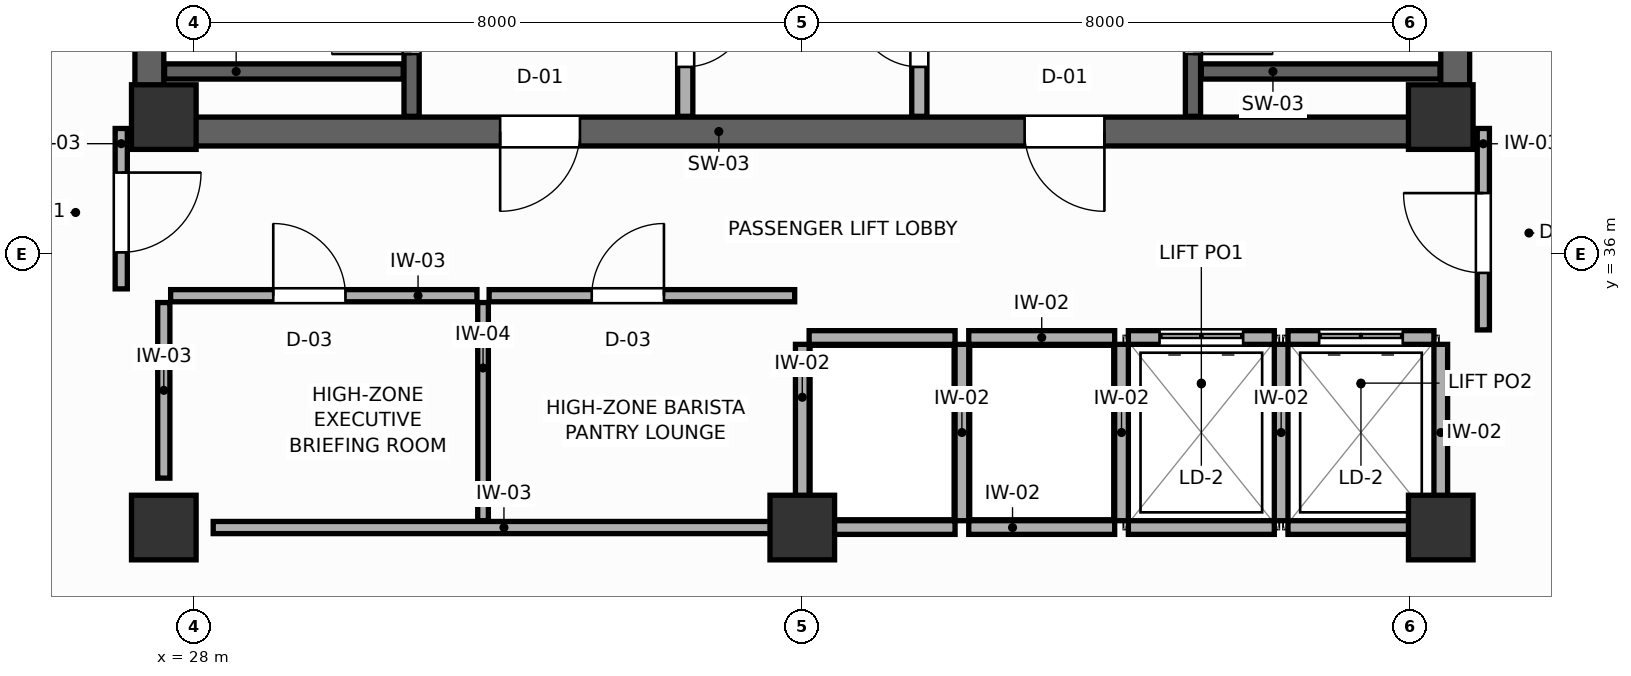
"""IFC4 building model, lengths in metres.
Left out: names, types, materials, properties, quantities, classifications, styles, units other than length and angle.
Written with IfcOpenShell. Run it as: python <this file> out.ifc"""

import sys

from ifc_helpers import new_model, si_unit, direction, frame, frame_2d, origin, origin_2d, place, context, subcontext, project, spatial, rectangle, extrude, source, transform, mapped, element, fill, save


model = new_model("IFC4")
c1 = context("Model", 3, precision=1e-05, world=origin(), true_north=direction((0.0, 1.0)))
c2 = subcontext(c1, "Body", "Model", "MODEL_VIEW")
j1 = project(units=[si_unit("LENGTHUNIT", "METRE"), si_unit("PLANEANGLEUNIT", "RADIAN")], contexts=[c1])
p1 = place(None, origin())
s1 = spatial("IfcSite", under=j1, at=p1, CompositionType="ELEMENT")
p2 = place(p1, origin())
s2 = spatial("IfcBuilding", under=s1, at=p2, CompositionType="ELEMENT")
p3 = place(p2, frame((0.0, 0.0, 275.4)))
s3 = spatial("IfcBuildingStorey", under=s2, at=p3, CompositionType="ELEMENT", Elevation=275.4)
p4 = place(p3, frame((27.22, 37.61, 0.0), z_axis=(0.0, 0.0, 1.0), x_axis=(1.0, 0.0, 0.0)))
e1 = element("IfcWall", 1, at=p4, inside=s3, PredefinedType="SHEAR", context=c2, shape_type="SweptSolid", body=[
    extrude(rectangle(XDim=17.56, YDim=0.38, at=frame_2d((8.78, 0.0))), origin(), (0.0, 0.0, 1.0), 4.2),
])
p5 = place(p4, frame((4.805, 0.0, 0.0)))
e2 = element("IfcOpeningElement", 2, at=p5, cuts=e1, PredefinedType="OPENING", context=c2, shape_type="SweptSolid", body=[
    extrude(rectangle(XDim=1.05, YDim=2.1, at=frame_2d((0.525, 1.05))), frame((0.0, 0.2, 0.0), z_axis=(0.0, -1.0, 0.0), x_axis=(1.0, 0.0, 0.0)), (0.0, 0.0, 1.0), 0.4),
])
p6 = place(p4, frame((11.705, 0.0, 0.0)))
e3 = element("IfcOpeningElement", 3, at=p6, cuts=e1, PredefinedType="OPENING", context=c2, shape_type="SweptSolid", body=[
    extrude(rectangle(XDim=1.05, YDim=2.1, at=frame_2d((0.525, 1.05))), frame((0.0, 0.2, 0.0), z_axis=(0.0, -1.0, 0.0), x_axis=(1.0, 0.0, 0.0)), (0.0, 0.0, 1.0), 0.4),
])
for number, where, z_axis, x_axis in (
    (4, (27.41, 37.8, 0.0), (0.0, 0.0, 1.0), (0.0, 1.0, 0.0)),
    (5, (44.59, 37.8, 0.0), (0.0, 0.0, 1.0), (0.0, 1.0, 0.0)),
):
    element("IfcWall", number, at=place(p3, frame(where, z_axis=z_axis, x_axis=x_axis)), inside=s3, PredefinedType="SHEAR", context=c2, shape_type="SweptSolid", body=[
        extrude(rectangle(XDim=9.0, YDim=0.38, at=frame_2d((4.5, 0.0))), origin(), (0.0, 0.0, 1.0), 4.2),
    ])
m1 = source(origin(), c2, "Body", "SweptSolid", [
    extrude(rectangle(XDim=0.85, YDim=0.85, at=origin_2d()), origin(), (0.0, 0.0, 1.0), 4.2),
])
for number, where, z_axis, x_axis in (
    (6, (27.6, 37.8, 0.0), (0.0, 0.0, 1.0), (1.0, 0.0, 0.0)),
    (7, (44.4, 37.8, 0.0), (0.0, 0.0, 1.0), (1.0, 0.0, 0.0)),
    (8, (27.6, 32.4, 0.0), (0.0, 0.0, 1.0), (1.0, 0.0, 0.0)),
    (9, (44.4, 32.4, 0.0), (0.0, 0.0, 1.0), (1.0, 0.0, 0.0)),
    (10, (36.0, 32.4, 0.0), (0.0, 0.0, 1.0), (1.0, 0.0, 0.0)),
):
    element("IfcColumn", number, at=place(p3, frame(where, z_axis=z_axis, x_axis=x_axis)), inside=s3, PredefinedType="COLUMN", context=c2, shape_type="MappedRepresentation", body=[
        mapped(m1, transform((0.0, 0.0, 0.0), scale=1.0)),
    ])
p7 = place(p3, frame((30.86, 37.81, 0.0), z_axis=(0.0, 0.0, 1.0), x_axis=(0.0, 1.0, 0.0)))
e11 = element("IfcWall", 11, at=p7, inside=s3, PredefinedType="SHEAR", context=c2, shape_type="SweptSolid", body=[
    extrude(rectangle(XDim=8.98, YDim=0.2, at=frame_2d((4.49, 0.0))), origin(), (0.0, 0.0, 1.0), 4.2),
])
p8 = place(p7, frame((0.82, 0.0, 0.0)))
e12 = element("IfcOpeningElement", 12, at=p8, cuts=e11, PredefinedType="OPENING", context=c2, shape_type="SweptSolid", body=[
    extrude(rectangle(XDim=1.05, YDim=2.1, at=frame_2d((0.525, 1.05))), frame((0.0, 0.11, 0.0), z_axis=(0.0, -1.0, 0.0), x_axis=(1.0, 0.0, 0.0)), (0.0, 0.0, 1.0), 0.22),
])
p9 = place(p3, frame((27.61, 38.4, 0.0), z_axis=(0.0, 0.0, 1.0), x_axis=(1.0, 0.0, 0.0)))
e13 = element("IfcWall", 13, at=p9, inside=s3, PredefinedType="SHEAR", context=c2, shape_type="SweptSolid", body=[
    extrude(rectangle(XDim=3.14, YDim=0.2, at=frame_2d((1.57, 0.0))), origin(), (0.0, 0.0, 1.0), 4.2),
])
p10 = place(p3, frame((41.14, 37.81, 0.0), z_axis=(0.0, 0.0, 1.0), x_axis=(0.0, 1.0, 0.0)))
e14 = element("IfcWall", 14, at=p10, inside=s3, PredefinedType="SHEAR", context=c2, shape_type="SweptSolid", body=[
    extrude(rectangle(XDim=8.98, YDim=0.2, at=frame_2d((4.49, 0.0))), origin(), (0.0, 0.0, 1.0), 4.2),
])
p11 = place(p10, frame((0.82, 0.0, 0.0)))
e15 = element("IfcOpeningElement", 15, at=p11, cuts=e14, PredefinedType="OPENING", context=c2, shape_type="SweptSolid", body=[
    extrude(rectangle(XDim=1.05, YDim=2.1, at=frame_2d((0.525, 1.05))), frame((0.0, 0.11, 0.0), z_axis=(0.0, -1.0, 0.0), x_axis=(1.0, 0.0, 0.0)), (0.0, 0.0, 1.0), 0.22),
])
p12 = place(p3, frame((41.25, 38.4, 0.0), z_axis=(0.0, 0.0, 1.0), x_axis=(1.0, 0.0, 0.0)))
e16 = element("IfcWall", 16, at=p12, inside=s3, PredefinedType="SHEAR", context=c2, shape_type="SweptSolid", body=[
    extrude(rectangle(XDim=3.14, YDim=0.2, at=frame_2d((1.57, 0.0))), origin(), (0.0, 0.0, 1.0), 4.2),
])
p13 = place(p3, frame((34.46, 37.81, 0.0), z_axis=(0.0, 0.0, 1.0), x_axis=(0.0, 1.0, 0.0)))
e17 = element("IfcWall", 17, at=p13, inside=s3, PredefinedType="PARTITIONING", context=c2, shape_type="SweptSolid", body=[
    extrude(rectangle(XDim=8.98, YDim=0.2, at=frame_2d((4.49, 0.0))), origin(), (0.0, 0.0, 1.0), 3.96),
])
p14 = place(p13, frame((0.65, 0.0, 0.0)))
e18 = element("IfcOpeningElement", 18, at=p14, cuts=e17, PredefinedType="OPENING", context=c2, shape_type="SweptSolid", body=[
    extrude(rectangle(XDim=0.85, YDim=2.05, at=frame_2d((0.425, 1.025))), frame((0.0, 0.11, 0.0), z_axis=(0.0, -1.0, 0.0), x_axis=(1.0, 0.0, 0.0)), (0.0, 0.0, 1.0), 0.22),
])
p15 = place(p3, frame((37.54, 37.81, 0.0), z_axis=(0.0, 0.0, 1.0), x_axis=(0.0, 1.0, 0.0)))
e19 = element("IfcWall", 19, at=p15, inside=s3, PredefinedType="PARTITIONING", context=c2, shape_type="SweptSolid", body=[
    extrude(rectangle(XDim=8.98, YDim=0.2, at=frame_2d((4.49, 0.0))), origin(), (0.0, 0.0, 1.0), 3.96),
])
p16 = place(p15, frame((0.65, 0.0, 0.0)))
e20 = element("IfcOpeningElement", 20, at=p16, cuts=e19, PredefinedType="OPENING", context=c2, shape_type="SweptSolid", body=[
    extrude(rectangle(XDim=0.85, YDim=2.05, at=frame_2d((0.425, 1.025))), frame((0.0, 0.11, 0.0), z_axis=(0.0, -1.0, 0.0), x_axis=(1.0, 0.0, 0.0)), (0.0, 0.0, 1.0), 0.22),
])
p17 = place(p3, frame((36.09, 34.9, 0.0), z_axis=(0.0, 0.0, 1.0), x_axis=(1.0, 0.0, 0.0)))
e21 = element("IfcWall", 21, at=p17, inside=s3, PredefinedType="PARTITIONING", context=c2, shape_type="SweptSolid", body=[
    extrude(rectangle(XDim=1.92, YDim=0.18, at=frame_2d((0.96, 0.0))), origin(), (0.0, 0.0, 1.0), 3.96),
])
p18 = place(p3, frame((36.09, 32.4, 0.0), z_axis=(0.0, 0.0, 1.0), x_axis=(1.0, 0.0, 0.0)))
e22 = element("IfcWall", 22, at=p18, inside=s3, PredefinedType="PARTITIONING", context=c2, shape_type="SweptSolid", body=[
    extrude(rectangle(XDim=1.92, YDim=0.18, at=frame_2d((0.96, 0.0))), origin(), (0.0, 0.0, 1.0), 2.52),
])
p19 = place(p3, frame((36.0, 32.49, 0.0), z_axis=(0.0, 0.0, 1.0), x_axis=(0.0, 1.0, 0.0)))
e23 = element("IfcWall", 23, at=p19, inside=s3, PredefinedType="PARTITIONING", context=c2, shape_type="SweptSolid", body=[
    extrude(rectangle(XDim=2.32, YDim=0.18, at=frame_2d((1.16, 0.0))), origin(), (0.0, 0.0, 1.0), 3.96),
])
p20 = place(p3, frame((38.19, 34.9, 0.0), z_axis=(0.0, 0.0, 1.0), x_axis=(1.0, 0.0, 0.0)))
e24 = element("IfcWall", 24, at=p20, inside=s3, PredefinedType="PARTITIONING", context=c2, shape_type="SweptSolid", body=[
    extrude(rectangle(XDim=1.92, YDim=0.18, at=frame_2d((0.96, 0.0))), origin(), (0.0, 0.0, 1.0), 3.96),
])
p21 = place(p3, frame((38.19, 32.4, 0.0), z_axis=(0.0, 0.0, 1.0), x_axis=(1.0, 0.0, 0.0)))
e25 = element("IfcWall", 25, at=p21, inside=s3, PredefinedType="PARTITIONING", context=c2, shape_type="SweptSolid", body=[
    extrude(rectangle(XDim=1.92, YDim=0.18, at=frame_2d((0.96, 0.0))), origin(), (0.0, 0.0, 1.0), 2.52),
])
p22 = place(p3, frame((38.1, 32.49, 0.0), z_axis=(0.0, 0.0, 1.0), x_axis=(0.0, 1.0, 0.0)))
e26 = element("IfcWall", 26, at=p22, inside=s3, PredefinedType="PARTITIONING", context=c2, shape_type="SweptSolid", body=[
    extrude(rectangle(XDim=2.32, YDim=0.18, at=frame_2d((1.16, 0.0))), origin(), (0.0, 0.0, 1.0), 3.96),
])
p23 = place(p3, frame((40.29, 34.9, 0.0), z_axis=(0.0, 0.0, 1.0), x_axis=(1.0, 0.0, 0.0)))
e27 = element("IfcWall", 27, at=p23, inside=s3, PredefinedType="PARTITIONING", context=c2, shape_type="SweptSolid", body=[
    extrude(rectangle(XDim=1.92, YDim=0.18, at=frame_2d((0.96, 0.0))), origin(), (0.0, 0.0, 1.0), 3.96),
])
p24 = place(p23, frame((0.41, 0.0, 0.0)))
e28 = element("IfcOpeningElement", 28, at=p24, cuts=e27, PredefinedType="OPENING", context=c2, shape_type="SweptSolid", body=[
    extrude(rectangle(XDim=1.1, YDim=2.1, at=frame_2d((0.55, 1.05))), frame((0.0, 0.1, 0.0), z_axis=(0.0, -1.0, 0.0), x_axis=(1.0, 0.0, 0.0)), (0.0, 0.0, 1.0), 0.2),
])
p25 = place(p3, frame((40.29, 32.4, 0.0), z_axis=(0.0, 0.0, 1.0), x_axis=(1.0, 0.0, 0.0)))
e29 = element("IfcWall", 29, at=p25, inside=s3, PredefinedType="PARTITIONING", context=c2, shape_type="SweptSolid", body=[
    extrude(rectangle(XDim=1.92, YDim=0.18, at=frame_2d((0.96, 0.0))), origin(), (0.0, 0.0, 1.0), 2.52),
])
p26 = place(p3, frame((40.2, 32.49, 0.0), z_axis=(0.0, 0.0, 1.0), x_axis=(0.0, 1.0, 0.0)))
e30 = element("IfcWall", 30, at=p26, inside=s3, PredefinedType="PARTITIONING", context=c2, shape_type="SweptSolid", body=[
    extrude(rectangle(XDim=2.32, YDim=0.18, at=frame_2d((1.16, 0.0))), origin(), (0.0, 0.0, 1.0), 3.96),
])
p27 = place(p3, frame((42.39, 34.9, 0.0), z_axis=(0.0, 0.0, 1.0), x_axis=(1.0, 0.0, 0.0)))
e31 = element("IfcWall", 31, at=p27, inside=s3, PredefinedType="PARTITIONING", context=c2, shape_type="SweptSolid", body=[
    extrude(rectangle(XDim=1.92, YDim=0.18, at=frame_2d((0.96, 0.0))), origin(), (0.0, 0.0, 1.0), 3.96),
])
p28 = place(p27, frame((0.41, 0.0, 0.0)))
e32 = element("IfcOpeningElement", 32, at=p28, cuts=e31, PredefinedType="OPENING", context=c2, shape_type="SweptSolid", body=[
    extrude(rectangle(XDim=1.1, YDim=2.1, at=frame_2d((0.55, 1.05))), frame((0.0, 0.1, 0.0), z_axis=(0.0, -1.0, 0.0), x_axis=(1.0, 0.0, 0.0)), (0.0, 0.0, 1.0), 0.2),
])
p29 = place(p3, frame((42.39, 32.4, 0.0), z_axis=(0.0, 0.0, 1.0), x_axis=(1.0, 0.0, 0.0)))
e33 = element("IfcWall", 33, at=p29, inside=s3, PredefinedType="PARTITIONING", context=c2, shape_type="SweptSolid", body=[
    extrude(rectangle(XDim=1.92, YDim=0.18, at=frame_2d((0.96, 0.0))), origin(), (0.0, 0.0, 1.0), 2.52),
])
for number, where, z_axis, x_axis in (
    (34, (42.3, 32.49, 0.0), (0.0, 0.0, 1.0), (0.0, 1.0, 0.0)),
    (35, (44.4, 32.49, 0.0), (0.0, 0.0, 1.0), (0.0, 1.0, 0.0)),
):
    element("IfcWall", number, at=place(p3, frame(where, z_axis=z_axis, x_axis=x_axis)), inside=s3, PredefinedType="PARTITIONING", context=c2, shape_type="SweptSolid", body=[
        extrude(rectangle(XDim=2.32, YDim=0.18, at=frame_2d((1.16, 0.0))), origin(), (0.0, 0.0, 1.0), 3.96),
    ])
p30 = place(p3, frame((28.25, 32.4, 0.0), z_axis=(0.0, 0.0, 1.0), x_axis=(1.0, 0.0, 0.0)))
e36 = element("IfcWall", 36, at=p30, inside=s3, PredefinedType="PARTITIONING", context=c2, shape_type="SweptSolid", body=[
    extrude(rectangle(XDim=7.65, YDim=0.16, at=frame_2d((3.825, 0.0))), origin(), (0.0, 0.0, 1.0), 2.52),
])
p31 = place(p3, frame((27.6, 33.05, 0.0), z_axis=(0.0, 0.0, 1.0), x_axis=(0.0, 1.0, 0.0)))
e37 = element("IfcWall", 37, at=p31, inside=s3, PredefinedType="PARTITIONING", context=c2, shape_type="SweptSolid", body=[
    extrude(rectangle(XDim=2.31, YDim=0.16, at=frame_2d((1.155, 0.0))), origin(), (0.0, 0.0, 1.0), 3.96),
])
p32 = place(p3, frame((31.8, 32.49, 0.0), z_axis=(0.0, 0.0, 1.0), x_axis=(0.0, 1.0, 0.0)))
e38 = element("IfcWall", 38, at=p32, inside=s3, PredefinedType="PARTITIONING", context=c2, shape_type="SweptSolid", body=[
    extrude(rectangle(XDim=2.87, YDim=0.14, at=frame_2d((1.435, 0.0))), origin(), (0.0, 0.0, 1.0), 3.96),
])
p33 = place(p3, frame((27.69, 35.45, 0.0), z_axis=(0.0, 0.0, 1.0), x_axis=(1.0, 0.0, 0.0)))
e39 = element("IfcWall", 39, at=p33, inside=s3, PredefinedType="PARTITIONING", context=c2, shape_type="SweptSolid", body=[
    extrude(rectangle(XDim=4.03, YDim=0.16, at=frame_2d((2.015, 0.0))), origin(), (0.0, 0.0, 1.0), 3.96),
])
p34 = place(p33, frame((1.35, 0.0, 0.0)))
e40 = element("IfcOpeningElement", 40, at=p34, cuts=e39, PredefinedType="OPENING", context=c2, shape_type="SweptSolid", body=[
    extrude(rectangle(XDim=0.95, YDim=2.05, at=frame_2d((0.475, 1.025))), frame((0.0, 0.09, 0.0), z_axis=(0.0, -1.0, 0.0), x_axis=(1.0, 0.0, 0.0)), (0.0, 0.0, 1.0), 0.18),
])
p35 = place(p3, frame((31.88, 35.45, 0.0), z_axis=(0.0, 0.0, 1.0), x_axis=(1.0, 0.0, 0.0)))
e41 = element("IfcWall", 41, at=p35, inside=s3, PredefinedType="PARTITIONING", context=c2, shape_type="SweptSolid", body=[
    extrude(rectangle(XDim=4.02, YDim=0.16, at=frame_2d((2.01, 0.0))), origin(), (0.0, 0.0, 1.0), 3.96),
])
p36 = place(p35, frame((1.35, 0.0, 0.0)))
e42 = element("IfcOpeningElement", 42, at=p36, cuts=e41, PredefinedType="OPENING", context=c2, shape_type="SweptSolid", body=[
    extrude(rectangle(XDim=0.95, YDim=2.05, at=frame_2d((0.475, 1.025))), frame((0.0, 0.09, 0.0), z_axis=(0.0, -1.0, 0.0), x_axis=(1.0, 0.0, 0.0)), (0.0, 0.0, 1.0), 0.18),
])
p37 = place(p3, frame((27.04, 35.54, 0.0), z_axis=(0.0, 0.0, 1.0), x_axis=(0.0, 1.0, 0.0)))
e43 = element("IfcWall", 43, at=p37, inside=s3, PredefinedType="PARTITIONING", context=c2, shape_type="SweptSolid", body=[
    extrude(rectangle(XDim=2.11, YDim=0.16, at=frame_2d((1.055, 0.0))), origin(), (0.0, 0.0, 1.0), 3.96),
])
p38 = place(p37, frame((0.48, 0.0, 0.0)))
e44 = element("IfcOpeningElement", 44, at=p38, cuts=e43, PredefinedType="OPENING", context=c2, shape_type="SweptSolid", body=[
    extrude(rectangle(XDim=1.05, YDim=2.1, at=frame_2d((0.525, 1.05))), frame((0.0, 0.09, 0.0), z_axis=(0.0, -1.0, 0.0), x_axis=(1.0, 0.0, 0.0)), (0.0, 0.0, 1.0), 0.18),
])
p39 = place(p3, frame((44.96, 35.0, 0.0), z_axis=(0.0, 0.0, 1.0), x_axis=(0.0, 1.0, 0.0)))
e45 = element("IfcWall", 45, at=p39, inside=s3, PredefinedType="PARTITIONING", context=c2, shape_type="SweptSolid", body=[
    extrude(rectangle(XDim=2.65, YDim=0.16, at=frame_2d((1.325, 0.0))), origin(), (0.0, 0.0, 1.0), 3.96),
])
p40 = place(p39, frame((0.75, 0.0, 0.0)))
e46 = element("IfcOpeningElement", 46, at=p40, cuts=e45, PredefinedType="OPENING", context=c2, shape_type="SweptSolid", body=[
    extrude(rectangle(XDim=1.05, YDim=2.1, at=frame_2d((0.525, 1.05))), frame((0.0, 0.09, 0.0), z_axis=(0.0, -1.0, 0.0), x_axis=(1.0, 0.0, 0.0)), (0.0, 0.0, 1.0), 0.18),
])
p41 = place(p8, origin())
e47 = element("IfcDoor", 47, at=p41, inside=s3, OperationType="SINGLE_SWING_LEFT", PredefinedType="DOOR", context=c2, shape_type="SweptSolid", body=[
    extrude(rectangle(XDim=1.05, YDim=2.1, at=frame_2d((0.525, 1.05))), frame((0.0, 0.025, 0.0), z_axis=(0.0, -1.0, 0.0), x_axis=(1.0, 0.0, 0.0)), (0.0, 0.0, 1.0), 0.05),
])
fill(e12, e47)
p42 = place(p11, frame((1.05, 0.0, 0.0), z_axis=(0.0, 0.0, 1.0), x_axis=(-1.0, 0.0, 0.0)))
e48 = element("IfcDoor", 48, at=p42, inside=s3, OperationType="SINGLE_SWING_RIGHT", PredefinedType="DOOR", context=c2, shape_type="SweptSolid", body=[
    extrude(rectangle(XDim=1.05, YDim=2.1, at=frame_2d((0.525, 1.05))), frame((0.0, 0.025, 0.0), z_axis=(0.0, -1.0, 0.0), x_axis=(1.0, 0.0, 0.0)), (0.0, 0.0, 1.0), 0.05),
])
fill(e15, e48)
p43 = place(p14, frame((0.85, 0.0, 0.0), z_axis=(0.0, 0.0, 1.0), x_axis=(-1.0, 0.0, 0.0)))
e49 = element("IfcDoor", 49, at=p43, inside=s3, OperationType="SINGLE_SWING_LEFT", PredefinedType="DOOR", context=c2, shape_type="SweptSolid", body=[
    extrude(rectangle(XDim=0.85, YDim=2.05, at=frame_2d((0.425, 1.025))), frame((0.0, 0.025, 0.0), z_axis=(0.0, -1.0, 0.0), x_axis=(1.0, 0.0, 0.0)), (0.0, 0.0, 1.0), 0.05),
])
fill(e18, e49)
p44 = place(p16, origin())
e50 = element("IfcDoor", 50, at=p44, inside=s3, OperationType="SINGLE_SWING_RIGHT", PredefinedType="DOOR", context=c2, shape_type="SweptSolid", body=[
    extrude(rectangle(XDim=0.85, YDim=2.05, at=frame_2d((0.425, 1.025))), frame((0.0, 0.025, 0.0), z_axis=(0.0, -1.0, 0.0), x_axis=(1.0, 0.0, 0.0)), (0.0, 0.0, 1.0), 0.05),
])
fill(e20, e50)
p45 = place(p24, origin())
e51 = element("IfcDoor", 51, at=p45, inside=s3, OperationType="DOUBLE_DOOR_SLIDING", PredefinedType="DOOR", context=c2, shape_type="SweptSolid", body=[
    extrude(rectangle(XDim=1.1, YDim=2.1, at=frame_2d((0.55, 1.05))), frame((0.0, 0.025, 0.0), z_axis=(0.0, -1.0, 0.0), x_axis=(1.0, 0.0, 0.0)), (0.0, 0.0, 1.0), 0.05),
])
fill(e28, e51)
p46 = place(p28, origin())
e52 = element("IfcDoor", 52, at=p46, inside=s3, OperationType="DOUBLE_DOOR_SLIDING", PredefinedType="DOOR", context=c2, shape_type="SweptSolid", body=[
    extrude(rectangle(XDim=1.1, YDim=2.1, at=frame_2d((0.55, 1.05))), frame((0.0, 0.025, 0.0), z_axis=(0.0, -1.0, 0.0), x_axis=(1.0, 0.0, 0.0)), (0.0, 0.0, 1.0), 0.05),
])
fill(e32, e52)
p47 = place(p34, origin())
e53 = element("IfcDoor", 53, at=p47, inside=s3, OperationType="SINGLE_SWING_LEFT", PredefinedType="DOOR", context=c2, shape_type="SweptSolid", body=[
    extrude(rectangle(XDim=0.95, YDim=2.05, at=frame_2d((0.475, 1.025))), frame((0.0, 0.025, 0.0), z_axis=(0.0, -1.0, 0.0), x_axis=(1.0, 0.0, 0.0)), (0.0, 0.0, 1.0), 0.05),
])
fill(e40, e53)
p48 = place(p36, origin())
e54 = element("IfcDoor", 54, at=p48, inside=s3, OperationType="SINGLE_SWING_RIGHT", PredefinedType="DOOR", context=c2, shape_type="SweptSolid", body=[
    extrude(rectangle(XDim=0.95, YDim=2.05, at=frame_2d((0.475, 1.025))), frame((0.0, 0.025, 0.0), z_axis=(0.0, -1.0, 0.0), x_axis=(1.0, 0.0, 0.0)), (0.0, 0.0, 1.0), 0.05),
])
fill(e42, e54)
p49 = place(p38, frame((1.05, 0.0, 0.0), z_axis=(0.0, 0.0, 1.0), x_axis=(-1.0, 0.0, 0.0)))
e55 = element("IfcDoor", 55, at=p49, inside=s3, OperationType="SINGLE_SWING_LEFT", PredefinedType="DOOR", context=c2, shape_type="SweptSolid", body=[
    extrude(rectangle(XDim=1.05, YDim=2.1, at=frame_2d((0.525, 1.05))), frame((0.0, 0.025, 0.0), z_axis=(0.0, -1.0, 0.0), x_axis=(1.0, 0.0, 0.0)), (0.0, 0.0, 1.0), 0.05),
])
fill(e44, e55)
p50 = place(p40, origin())
e56 = element("IfcDoor", 56, at=p50, inside=s3, OperationType="SINGLE_SWING_RIGHT", PredefinedType="DOOR", context=c2, shape_type="SweptSolid", body=[
    extrude(rectangle(XDim=1.05, YDim=2.1, at=frame_2d((0.525, 1.05))), frame((0.0, 0.025, 0.0), z_axis=(0.0, -1.0, 0.0), x_axis=(1.0, 0.0, 0.0)), (0.0, 0.0, 1.0), 0.05),
])
fill(e46, e56)
p51 = place(p5, frame((1.05, 0.0, 0.0), z_axis=(0.0, 0.0, 1.0), x_axis=(-1.0, 0.0, 0.0)))
e57 = element("IfcDoor", 57, at=p51, inside=s3, OperationType="SINGLE_SWING_RIGHT", PredefinedType="DOOR", context=c2, shape_type="SweptSolid", body=[
    extrude(rectangle(XDim=1.05, YDim=2.1, at=frame_2d((0.525, 1.05))), frame((0.0, 0.025, 0.0), z_axis=(0.0, -1.0, 0.0), x_axis=(1.0, 0.0, 0.0)), (0.0, 0.0, 1.0), 0.05),
])
fill(e2, e57)
p52 = place(p6, frame((1.05, 0.0, 0.0), z_axis=(0.0, 0.0, 1.0), x_axis=(-1.0, 0.0, 0.0)))
e58 = element("IfcDoor", 58, at=p52, inside=s3, OperationType="SINGLE_SWING_LEFT", PredefinedType="DOOR", context=c2, shape_type="SweptSolid", body=[
    extrude(rectangle(XDim=1.05, YDim=2.1, at=frame_2d((0.525, 1.05))), frame((0.0, 0.025, 0.0), z_axis=(0.0, -1.0, 0.0), x_axis=(1.0, 0.0, 0.0)), (0.0, 0.0, 1.0), 0.05),
])
fill(e3, e58)
save(model, sys.argv[1])
